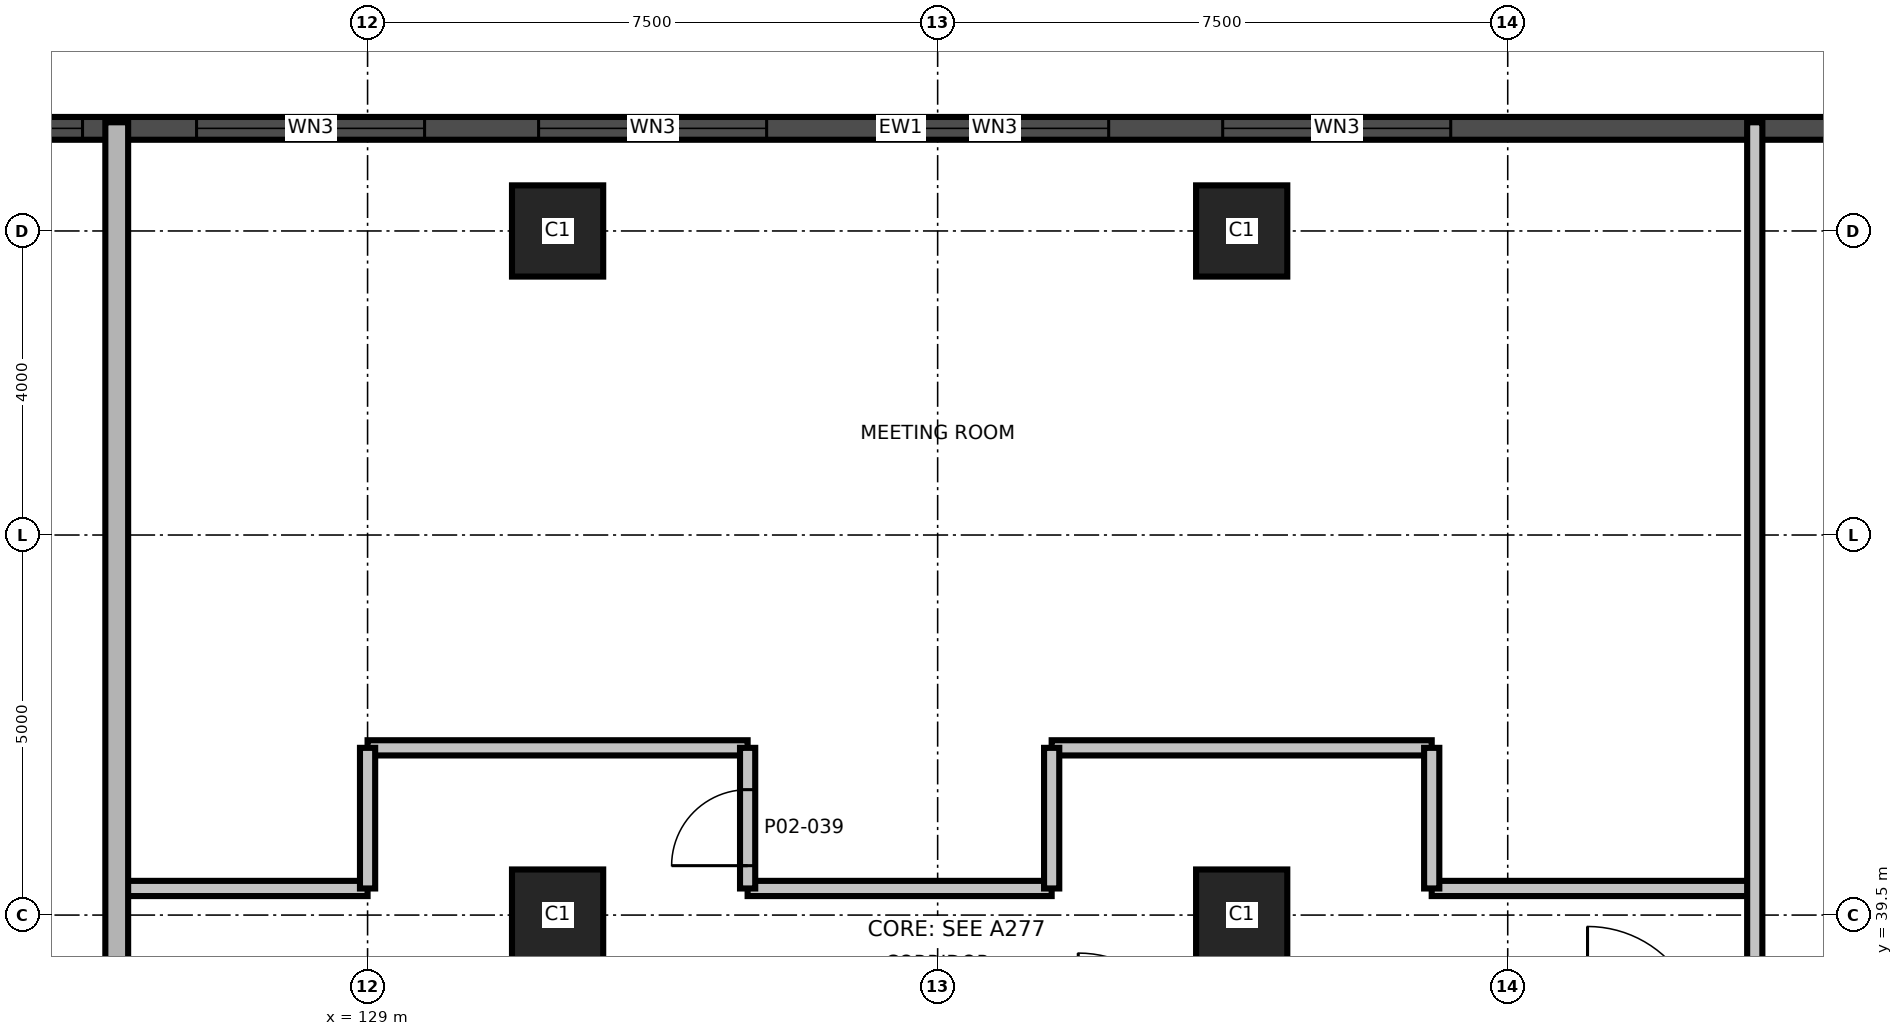
"""IFC4 building model, lengths in metres.
Left out: names, types, materials, properties, quantities, classifications, styles, units other than length and angle.
Written with IfcOpenShell. Run it as: python <this file> out.ifc"""

import sys

from ifc_helpers import new_model, si_unit, direction, frame, frame_2d, origin, origin_2d, place, context, subcontext, project, spatial, rectangle, extrude, element, fill, save


model = new_model("IFC4")
c1 = context("Model", 3, precision=1e-05, world=origin(), true_north=direction((0.0, 1.0)))
c2 = subcontext(c1, "Body", "Model", "MODEL_VIEW")
j1 = project(units=[si_unit("LENGTHUNIT", "METRE"), si_unit("PLANEANGLEUNIT", "RADIAN")], contexts=[c1])
p1 = place(None, origin())
s1 = spatial("IfcSite", under=j1, at=p1, CompositionType="ELEMENT")
p2 = place(p1, origin())
s2 = spatial("IfcBuilding", under=s1, at=p2, CompositionType="ELEMENT")
p3 = place(p2, frame((0.0, 0.0, 13.5)))
s3 = spatial("IfcBuildingStorey", under=s2, at=p3, CompositionType="ELEMENT", Elevation=13.5)
for number, where, z_axis, x_axis in (
    (1, (131.5, 39.5, 0.0), (0.0, 0.0, 1.0), (1.0, 0.0, 0.0)),
    (2, (140.5, 39.5, 0.0), (0.0, 0.0, 1.0), (1.0, 0.0, 0.0)),
    (3, (131.5, 48.5, 0.0), (0.0, 0.0, 1.0), (1.0, 0.0, 0.0)),
    (4, (140.5, 48.5, 0.0), (0.0, 0.0, 1.0), (1.0, 0.0, 0.0)),
):
    element("IfcColumn", number, at=place(p3, frame(where, z_axis=z_axis, x_axis=x_axis)), inside=s3, PredefinedType="COLUMN", context=c2, shape_type="SweptSolid", body=[
        extrude(rectangle(XDim=1.2, YDim=1.2, at=origin_2d()), origin(), (0.0, 0.0, 1.0), 5.0),
    ])
p4 = place(p3, frame((153.952, 49.85, 0.0), z_axis=(0.0, 0.0, 1.0), x_axis=(-1.0, 0.0, 0.0)))
e5 = element("IfcWall", 5, at=p4, inside=s3, PredefinedType="SOLIDWALL", context=c2, shape_type="SweptSolid", body=[
    extrude(rectangle(XDim=35.88, YDim=0.3, at=frame_2d((17.94, 0.0))), origin(), (0.0, 0.0, 1.0), 4.7),
])
p5 = place(p4, frame((1.226, 0.0, 0.9)))
e6 = element("IfcOpeningElement", 6, at=p5, cuts=e5, PredefinedType="OPENING", context=c2, shape_type="SweptSolid", body=[
    extrude(rectangle(XDim=3.0, YDim=2.4, at=frame_2d((1.5, 1.2))), frame((0.0, 0.16, 0.0), z_axis=(0.0, -1.0, 0.0), x_axis=(1.0, 0.0, 0.0)), (0.0, 0.0, 1.0), 0.32),
])
p6 = place(p4, frame((10.702, 0.0, 0.9)))
e7 = element("IfcOpeningElement", 7, at=p6, cuts=e5, PredefinedType="OPENING", context=c2, shape_type="SweptSolid", body=[
    extrude(rectangle(XDim=3.0, YDim=2.4, at=frame_2d((1.5, 1.2))), frame((0.0, 0.16, 0.0), z_axis=(0.0, -1.0, 0.0), x_axis=(1.0, 0.0, 0.0)), (0.0, 0.0, 1.0), 0.32),
])
p7 = place(p4, frame((15.202, 0.0, 0.9)))
e8 = element("IfcOpeningElement", 8, at=p7, cuts=e5, PredefinedType="OPENING", context=c2, shape_type="SweptSolid", body=[
    extrude(rectangle(XDim=3.0, YDim=2.4, at=frame_2d((1.5, 1.2))), frame((0.0, 0.16, 0.0), z_axis=(0.0, -1.0, 0.0), x_axis=(1.0, 0.0, 0.0)), (0.0, 0.0, 1.0), 0.32),
])
p8 = place(p4, frame((19.702, 0.0, 0.9)))
e9 = element("IfcOpeningElement", 9, at=p8, cuts=e5, PredefinedType="OPENING", context=c2, shape_type="SweptSolid", body=[
    extrude(rectangle(XDim=3.0, YDim=2.4, at=frame_2d((1.5, 1.2))), frame((0.0, 0.16, 0.0), z_axis=(0.0, -1.0, 0.0), x_axis=(1.0, 0.0, 0.0)), (0.0, 0.0, 1.0), 0.32),
])
p9 = place(p4, frame((24.202, 0.0, 0.9)))
e10 = element("IfcOpeningElement", 10, at=p9, cuts=e5, PredefinedType="OPENING", context=c2, shape_type="SweptSolid", body=[
    extrude(rectangle(XDim=3.0, YDim=2.4, at=frame_2d((1.5, 1.2))), frame((0.0, 0.16, 0.0), z_axis=(0.0, -1.0, 0.0), x_axis=(1.0, 0.0, 0.0)), (0.0, 0.0, 1.0), 0.32),
])
p10 = place(p4, frame((28.702, 0.0, 0.9)))
e11 = element("IfcOpeningElement", 11, at=p10, cuts=e5, PredefinedType="OPENING", context=c2, shape_type="SweptSolid", body=[
    extrude(rectangle(XDim=3.0, YDim=2.4, at=frame_2d((1.5, 1.2))), frame((0.0, 0.16, 0.0), z_axis=(0.0, -1.0, 0.0), x_axis=(1.0, 0.0, 0.0)), (0.0, 0.0, 1.0), 0.32),
])
p11 = place(p3, frame((125.75, 39.85, 0.0), z_axis=(0.0, 0.0, 1.0), x_axis=(1.0, 0.0, 0.0)))
e12 = element("IfcWall", 12, at=p11, inside=s3, PredefinedType="PARTITIONING", context=c2, shape_type="SweptSolid", body=[
    extrude(rectangle(XDim=3.25, YDim=0.2, at=frame_2d((1.625, 0.0))), origin(), (0.0, 0.0, 1.0), 4.7),
])
p12 = place(p3, frame((134.0, 39.85, 0.0), z_axis=(0.0, 0.0, 1.0), x_axis=(1.0, 0.0, 0.0)))
e13 = element("IfcWall", 13, at=p12, inside=s3, PredefinedType="PARTITIONING", context=c2, shape_type="SweptSolid", body=[
    extrude(rectangle(XDim=4.0, YDim=0.2, at=frame_2d((2.0, 0.0))), origin(), (0.0, 0.0, 1.0), 4.7),
])
p13 = place(p3, frame((143.0, 39.85, 0.0), z_axis=(0.0, 0.0, 1.0), x_axis=(1.0, 0.0, 0.0)))
e14 = element("IfcWall", 14, at=p13, inside=s3, PredefinedType="PARTITIONING", context=c2, shape_type="SweptSolid", body=[
    extrude(rectangle(XDim=4.25, YDim=0.2, at=frame_2d((2.125, 0.0))), origin(), (0.0, 0.0, 1.0), 4.7),
])
for number, where, z_axis, x_axis in (
    (15, (129.0, 41.7, 0.0), (0.0, 0.0, 1.0), (1.0, 0.0, 0.0)),
    (16, (138.0, 41.7, 0.0), (0.0, 0.0, 1.0), (1.0, 0.0, 0.0)),
):
    element("IfcWall", number, at=place(p3, frame(where, z_axis=z_axis, x_axis=x_axis)), inside=s3, PredefinedType="PARTITIONING", context=c2, shape_type="SweptSolid", body=[
        extrude(rectangle(XDim=5.0, YDim=0.2, at=frame_2d((2.5, 0.0))), origin(), (0.0, 0.0, 1.0), 4.7),
    ])
p14 = place(p3, frame((125.7, 11.07, 0.0), z_axis=(0.0, 0.0, 1.0), x_axis=(0.0, 1.0, 0.0)))
e17 = element("IfcWall", 17, at=p14, inside=s3, PredefinedType="SHEAR", context=c2, shape_type="SweptSolid", body=[
    extrude(rectangle(XDim=38.86, YDim=0.3, at=frame_2d((19.43, 0.0))), origin(), (0.0, 0.0, 1.0), 4.7),
])
p15 = place(p14, frame((14.226, 0.0, 0.0)))
e18 = element("IfcOpeningElement", 18, at=p15, cuts=e17, PredefinedType="OPENING", context=c2, shape_type="SweptSolid", body=[
    extrude(rectangle(XDim=1.0, YDim=2.1, at=frame_2d((0.5, 1.05))), frame((0.0, 0.16, 0.0), z_axis=(0.0, -1.0, 0.0), x_axis=(1.0, 0.0, 0.0)), (0.0, 0.0, 1.0), 0.32),
])
p16 = place(p14, frame((25.835, 0.0, 0.0)))
e19 = element("IfcOpeningElement", 19, at=p16, cuts=e17, PredefinedType="OPENING", context=c2, shape_type="SweptSolid", body=[
    extrude(rectangle(XDim=1.0, YDim=2.1, at=frame_2d((0.5, 1.05))), frame((0.0, 0.16, 0.0), z_axis=(0.0, -1.0, 0.0), x_axis=(1.0, 0.0, 0.0)), (0.0, 0.0, 1.0), 0.32),
])
p17 = place(p3, frame((129.0, 39.85, 0.0), z_axis=(0.0, 0.0, 1.0), x_axis=(0.0, 1.0, 0.0)))
e20 = element("IfcWall", 20, at=p17, inside=s3, PredefinedType="PARTITIONING", context=c2, shape_type="SweptSolid", body=[
    extrude(rectangle(XDim=1.85, YDim=0.2, at=frame_2d((0.925, 0.0))), origin(), (0.0, 0.0, 1.0), 4.7),
])
p18 = place(p3, frame((134.0, 39.85, 0.0), z_axis=(0.0, 0.0, 1.0), x_axis=(0.0, 1.0, 0.0)))
e21 = element("IfcWall", 21, at=p18, inside=s3, PredefinedType="PARTITIONING", context=c2, shape_type="SweptSolid", body=[
    extrude(rectangle(XDim=1.85, YDim=0.2, at=frame_2d((0.925, 0.0))), origin(), (0.0, 0.0, 1.0), 4.7),
])
p19 = place(p18, frame((0.3, 0.0, 0.0)))
e22 = element("IfcOpeningElement", 22, at=p19, cuts=e21, PredefinedType="OPENING", context=c2, shape_type="SweptSolid", body=[
    extrude(rectangle(XDim=1.0, YDim=2.1, at=frame_2d((0.5, 1.05))), frame((0.0, 0.11, 0.0), z_axis=(0.0, -1.0, 0.0), x_axis=(1.0, 0.0, 0.0)), (0.0, 0.0, 1.0), 0.22),
])
for number, where, z_axis, x_axis in (
    (23, (138.0, 39.85, 0.0), (0.0, 0.0, 1.0), (0.0, 1.0, 0.0)),
    (24, (143.0, 39.85, 0.0), (0.0, 0.0, 1.0), (0.0, 1.0, 0.0)),
):
    element("IfcWall", number, at=place(p3, frame(where, z_axis=z_axis, x_axis=x_axis)), inside=s3, PredefinedType="PARTITIONING", context=c2, shape_type="SweptSolid", body=[
        extrude(rectangle(XDim=1.85, YDim=0.2, at=frame_2d((0.925, 0.0))), origin(), (0.0, 0.0, 1.0), 4.7),
    ])
p20 = place(p3, frame((147.25, 11.07, 0.0), z_axis=(0.0, 0.0, 1.0), x_axis=(0.0, 1.0, 0.0)))
e25 = element("IfcWall", 25, at=p20, inside=s3, PredefinedType="PARTITIONING", context=c2, shape_type="SweptSolid", body=[
    extrude(rectangle(XDim=38.86, YDim=0.2, at=frame_2d((19.43, 0.0))), origin(), (0.0, 0.0, 1.0), 4.7),
])
p21 = place(p20, frame((18.18, 0.0, 0.0)))
e26 = element("IfcOpeningElement", 26, at=p21, cuts=e25, PredefinedType="OPENING", context=c2, shape_type="SweptSolid", body=[
    extrude(rectangle(XDim=1.5, YDim=2.1, at=frame_2d((0.75, 1.05))), frame((0.0, 0.11, 0.0), z_axis=(0.0, -1.0, 0.0), x_axis=(1.0, 0.0, 0.0)), (0.0, 0.0, 1.0), 0.22),
])
p22 = place(p20, frame((5.03, 0.0, 0.0)))
e27 = element("IfcOpeningElement", 27, at=p22, cuts=e25, PredefinedType="OPENING", context=c2, shape_type="SweptSolid", body=[
    extrude(rectangle(XDim=1.0, YDim=2.1, at=frame_2d((0.5, 1.05))), frame((0.0, 0.11, 0.0), z_axis=(0.0, -1.0, 0.0), x_axis=(1.0, 0.0, 0.0)), (0.0, 0.0, 1.0), 0.22),
])
p23 = place(p6, origin())
e28 = element("IfcWindow", 28, at=p23, inside=s3, PartitioningType="SINGLE_PANEL", PredefinedType="WINDOW", context=c2, shape_type="SweptSolid", body=[
    extrude(rectangle(XDim=3.0, YDim=2.4, at=frame_2d((1.5, 1.2))), frame((0.0, 0.03, 0.0), z_axis=(0.0, -1.0, 0.0), x_axis=(1.0, 0.0, 0.0)), (0.0, 0.0, 1.0), 0.06),
])
fill(e7, e28)
p24 = place(p7, origin())
e29 = element("IfcWindow", 29, at=p24, inside=s3, PartitioningType="SINGLE_PANEL", PredefinedType="WINDOW", context=c2, shape_type="SweptSolid", body=[
    extrude(rectangle(XDim=3.0, YDim=2.4, at=frame_2d((1.5, 1.2))), frame((0.0, 0.03, 0.0), z_axis=(0.0, -1.0, 0.0), x_axis=(1.0, 0.0, 0.0)), (0.0, 0.0, 1.0), 0.06),
])
fill(e8, e29)
p25 = place(p8, origin())
e30 = element("IfcWindow", 30, at=p25, inside=s3, PartitioningType="SINGLE_PANEL", PredefinedType="WINDOW", context=c2, shape_type="SweptSolid", body=[
    extrude(rectangle(XDim=3.0, YDim=2.4, at=frame_2d((1.5, 1.2))), frame((0.0, 0.03, 0.0), z_axis=(0.0, -1.0, 0.0), x_axis=(1.0, 0.0, 0.0)), (0.0, 0.0, 1.0), 0.06),
])
fill(e9, e30)
p26 = place(p9, origin())
e31 = element("IfcWindow", 31, at=p26, inside=s3, PartitioningType="SINGLE_PANEL", PredefinedType="WINDOW", context=c2, shape_type="SweptSolid", body=[
    extrude(rectangle(XDim=3.0, YDim=2.4, at=frame_2d((1.5, 1.2))), frame((0.0, 0.03, 0.0), z_axis=(0.0, -1.0, 0.0), x_axis=(1.0, 0.0, 0.0)), (0.0, 0.0, 1.0), 0.06),
])
fill(e10, e31)
p27 = place(p10, origin())
e32 = element("IfcWindow", 32, at=p27, inside=s3, PartitioningType="SINGLE_PANEL", PredefinedType="WINDOW", context=c2, shape_type="SweptSolid", body=[
    extrude(rectangle(XDim=3.0, YDim=2.4, at=frame_2d((1.5, 1.2))), frame((0.0, 0.03, 0.0), z_axis=(0.0, -1.0, 0.0), x_axis=(1.0, 0.0, 0.0)), (0.0, 0.0, 1.0), 0.06),
])
fill(e11, e32)
p28 = place(p19, origin())
e33 = element("IfcDoor", 33, at=p28, inside=s3, OperationType="SINGLE_SWING_LEFT", PredefinedType="DOOR", context=c2, shape_type="SweptSolid", body=[
    extrude(rectangle(XDim=1.0, YDim=2.1, at=frame_2d((0.5, 1.05))), frame((0.0, 0.025, 0.0), z_axis=(0.0, -1.0, 0.0), x_axis=(1.0, 0.0, 0.0)), (0.0, 0.0, 1.0), 0.05),
])
fill(e22, e33)
save(model, sys.argv[1])
